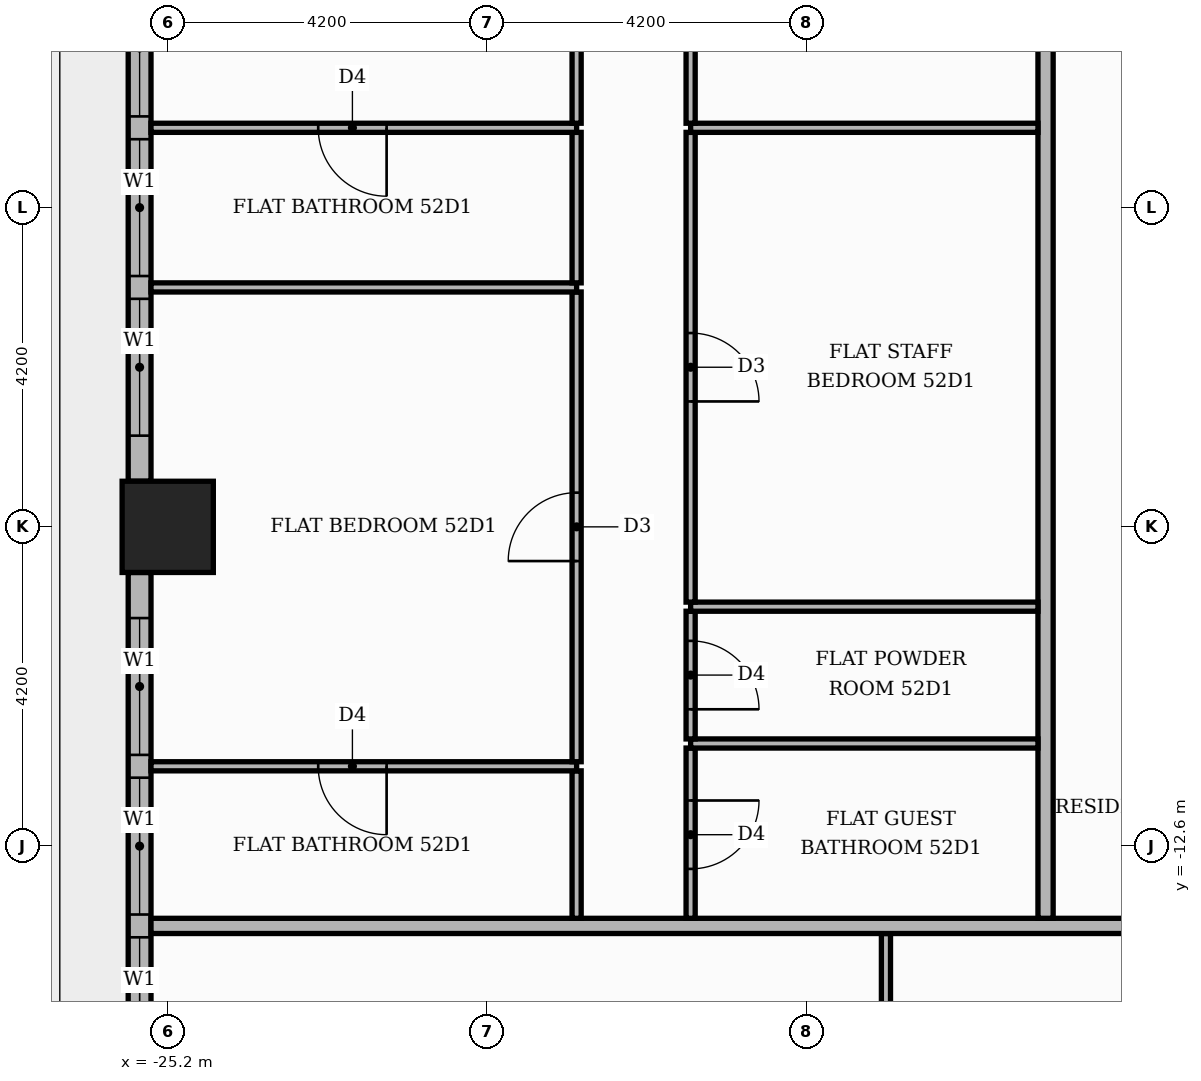
"""IFC4 building model, lengths in metres.
Left out: names, types, materials, properties, quantities, classifications, styles, units other than length and angle.
Written with IfcOpenShell. Run it as: python <this file> out.ifc"""

import sys

from ifc_helpers import new_model, si_unit, direction, frame, frame_2d, origin, origin_2d, place, context, subcontext, project, spatial, rectangle, extrude, element, fill, save


model = new_model("IFC4")
c1 = context("Model", 3, precision=1e-05, world=origin(), true_north=direction((0.0, 1.0)))
c2 = subcontext(c1, "Body", "Model", "MODEL_VIEW")
j1 = project(units=[si_unit("LENGTHUNIT", "METRE"), si_unit("PLANEANGLEUNIT", "RADIAN")], contexts=[c1])
p1 = place(None, origin())
s1 = spatial("IfcSite", under=j1, at=p1, CompositionType="ELEMENT")
p2 = place(p1, origin())
s2 = spatial("IfcBuilding", under=s1, at=p2, CompositionType="ELEMENT")
p3 = place(p2, frame((0.0, 0.0, 219.6)))
s3 = spatial("IfcBuildingStorey", under=s2, at=p3, CompositionType="ELEMENT", Elevation=219.6)
p4 = place(p3, frame((-25.2, -8.4, 0.0), z_axis=(0.0, 0.0, 1.0), x_axis=(1.0, 0.0, 0.0)))
e1 = element("IfcColumn", 1, at=p4, inside=s3, PredefinedType="COLUMN", context=c2, shape_type="SweptSolid", body=[
    extrude(rectangle(XDim=1.2, YDim=1.2, at=origin_2d()), origin(), (0.0, 0.0, 1.0), 3.9),
])
p5 = place(p3, frame((-25.57, -0.6, 0.0), z_axis=(0.0, 0.0, 1.0), x_axis=(0.0, -1.0, 0.0)))
e2 = element("IfcWall", 2, at=p5, inside=s3, PredefinedType="STANDARD", context=c2, shape_type="SweptSolid", body=[
    extrude(rectangle(XDim=7.2, YDim=0.3, at=frame_2d((3.6, 0.0))), origin(), (0.0, 0.0, 1.0), 3.48),
])
p6 = place(p5, frame((0.6, 0.0, 0.9)))
e3 = element("IfcOpeningElement", 3, at=p6, cuts=e2, PredefinedType="OPENING", context=c2, shape_type="SweptSolid", body=[
    extrude(rectangle(XDim=1.8, YDim=2.1, at=frame_2d((0.9, 1.05))), frame((0.0, 0.16, 0.0), z_axis=(0.0, -1.0, 0.0), x_axis=(1.0, 0.0, 0.0)), (0.0, 0.0, 1.0), 0.32),
])
p7 = place(p5, frame((2.7, 0.0, 0.9)))
e4 = element("IfcOpeningElement", 4, at=p7, cuts=e2, PredefinedType="OPENING", context=c2, shape_type="SweptSolid", body=[
    extrude(rectangle(XDim=1.8, YDim=2.1, at=frame_2d((0.9, 1.05))), frame((0.0, 0.16, 0.0), z_axis=(0.0, -1.0, 0.0), x_axis=(1.0, 0.0, 0.0)), (0.0, 0.0, 1.0), 0.32),
])
p8 = place(p5, frame((4.8, 0.0, 0.9)))
e5 = element("IfcOpeningElement", 5, at=p8, cuts=e2, PredefinedType="OPENING", context=c2, shape_type="SweptSolid", body=[
    extrude(rectangle(XDim=1.8, YDim=2.1, at=frame_2d((0.9, 1.05))), frame((0.0, 0.16, 0.0), z_axis=(0.0, -1.0, 0.0), x_axis=(1.0, 0.0, 0.0)), (0.0, 0.0, 1.0), 0.32),
])
p9 = place(p3, frame((-25.57, -9.0, 0.0), z_axis=(0.0, 0.0, 1.0), x_axis=(0.0, -1.0, 0.0)))
e6 = element("IfcWall", 6, at=p9, inside=s3, PredefinedType="STANDARD", context=c2, shape_type="SweptSolid", body=[
    extrude(rectangle(XDim=7.2, YDim=0.3, at=frame_2d((3.6, 0.0))), origin(), (0.0, 0.0, 1.0), 3.48),
])
p10 = place(p9, frame((0.6, 0.0, 0.9)))
e7 = element("IfcOpeningElement", 7, at=p10, cuts=e6, PredefinedType="OPENING", context=c2, shape_type="SweptSolid", body=[
    extrude(rectangle(XDim=1.8, YDim=2.1, at=frame_2d((0.9, 1.05))), frame((0.0, 0.16, 0.0), z_axis=(0.0, -1.0, 0.0), x_axis=(1.0, 0.0, 0.0)), (0.0, 0.0, 1.0), 0.32),
])
p11 = place(p9, frame((2.7, 0.0, 0.9)))
e8 = element("IfcOpeningElement", 8, at=p11, cuts=e6, PredefinedType="OPENING", context=c2, shape_type="SweptSolid", body=[
    extrude(rectangle(XDim=1.8, YDim=2.1, at=frame_2d((0.9, 1.05))), frame((0.0, 0.16, 0.0), z_axis=(0.0, -1.0, 0.0), x_axis=(1.0, 0.0, 0.0)), (0.0, 0.0, 1.0), 0.32),
])
p12 = place(p9, frame((4.8, 0.0, 0.9)))
e9 = element("IfcOpeningElement", 9, at=p12, cuts=e6, PredefinedType="OPENING", context=c2, shape_type="SweptSolid", body=[
    extrude(rectangle(XDim=1.8, YDim=2.1, at=frame_2d((0.9, 1.05))), frame((0.0, 0.16, 0.0), z_axis=(0.0, -1.0, 0.0), x_axis=(1.0, 0.0, 0.0)), (0.0, 0.0, 1.0), 0.32),
])
p13 = place(p3, frame((-15.75, -20.06, 0.0), z_axis=(0.0, 0.0, 1.0), x_axis=(0.0, 1.0, 0.0)))
e10 = element("IfcWall", 10, at=p13, inside=s3, PredefinedType="PARTITIONING", context=c2, shape_type="SweptSolid", body=[
    extrude(rectangle(XDim=6.31, YDim=0.12, at=frame_2d((3.155, 0.0))), origin(), (0.0, 0.0, 1.0), 3.48),
])
p14 = place(p13, frame((2.675, 0.0, 0.0)))
e11 = element("IfcOpeningElement", 11, at=p14, cuts=e10, PredefinedType="OPENING", context=c2, shape_type="SweptSolid", body=[
    extrude(rectangle(XDim=1.0, YDim=2.1, at=frame_2d((0.5, 1.05))), frame((0.0, 0.07, 0.0), z_axis=(0.0, -1.0, 0.0), x_axis=(1.0, 0.0, 0.0)), (0.0, 0.0, 1.0), 0.14),
])
p15 = place(p3, frame((-25.42, -13.65, 0.0), z_axis=(0.0, 0.0, 1.0), x_axis=(1.0, 0.0, 0.0)))
e12 = element("IfcWall", 12, at=p15, inside=s3, PredefinedType="PARTITIONING", context=c2, shape_type="SweptSolid", body=[
    extrude(rectangle(XDim=39.07, YDim=0.2, at=frame_2d((19.535, 0.0))), origin(), (0.0, 0.0, 1.0), 3.48),
])
p16 = place(p15, frame((13.32, 0.0, 0.0)))
e13 = element("IfcOpeningElement", 13, at=p16, cuts=e12, PredefinedType="OPENING", context=c2, shape_type="SweptSolid", body=[
    extrude(rectangle(XDim=1.1, YDim=2.4, at=frame_2d((0.55, 1.2))), frame((0.0, 0.11, 0.0), z_axis=(0.0, -1.0, 0.0), x_axis=(1.0, 0.0, 0.0)), (0.0, 0.0, 1.0), 0.22),
])
p17 = place(p15, frame((21.72, 0.0, 0.0)))
e14 = element("IfcOpeningElement", 14, at=p17, cuts=e12, PredefinedType="OPENING", context=c2, shape_type="SweptSolid", body=[
    extrude(rectangle(XDim=1.1, YDim=2.4, at=frame_2d((0.55, 1.2))), frame((0.0, 0.11, 0.0), z_axis=(0.0, -1.0, 0.0), x_axis=(1.0, 0.0, 0.0)), (0.0, 0.0, 1.0), 0.22),
])
p18 = place(p3, frame((-19.82, -13.55, 0.0), z_axis=(0.0, 0.0, 1.0), x_axis=(0.0, 1.0, 0.0)))
e15 = element("IfcWall", 15, at=p18, inside=s3, PredefinedType="PARTITIONING", context=c2, shape_type="SweptSolid", body=[
    extrude(rectangle(XDim=1.94, YDim=0.12, at=frame_2d((0.97, 0.0))), origin(), (0.0, 0.0, 1.0), 3.48),
])
p19 = place(p3, frame((-18.32, -13.55, 0.0), z_axis=(0.0, 0.0, 1.0), x_axis=(0.0, 1.0, 0.0)))
e16 = element("IfcWall", 16, at=p19, inside=s3, PredefinedType="PARTITIONING", context=c2, shape_type="SweptSolid", body=[
    extrude(rectangle(XDim=2.24, YDim=0.12, at=frame_2d((1.12, 0.0))), origin(), (0.0, 0.0, 1.0), 3.48),
])
p20 = place(p19, frame((0.65, 0.0, 0.0)))
e17 = element("IfcOpeningElement", 17, at=p20, cuts=e16, PredefinedType="OPENING", context=c2, shape_type="SweptSolid", body=[
    extrude(rectangle(XDim=0.9, YDim=2.1, at=frame_2d((0.45, 1.05))), frame((0.0, 0.07, 0.0), z_axis=(0.0, -1.0, 0.0), x_axis=(1.0, 0.0, 0.0)), (0.0, 0.0, 1.0), 0.14),
])
p21 = place(p3, frame((-13.65, -13.55, 0.0), z_axis=(0.0, 0.0, 1.0), x_axis=(0.0, 1.0, 0.0)))
e18 = element("IfcWall", 18, at=p21, inside=s3, PredefinedType="PARTITIONING", context=c2, shape_type="SweptSolid", body=[
    extrude(rectangle(XDim=27.1, YDim=0.2, at=frame_2d((13.55, 0.0))), origin(), (0.0, 0.0, 1.0), 3.48),
])
p22 = place(p21, frame((23.5, 0.0, 0.0)))
e19 = element("IfcOpeningElement", 19, at=p22, cuts=e18, PredefinedType="OPENING", context=c2, shape_type="SweptSolid", body=[
    extrude(rectangle(XDim=1.1, YDim=2.4, at=frame_2d((0.55, 1.2))), frame((0.0, 0.11, 0.0), z_axis=(0.0, -1.0, 0.0), x_axis=(1.0, 0.0, 0.0)), (0.0, 0.0, 1.0), 0.22),
])
p23 = place(p3, frame((-25.42, -11.55, 0.0), z_axis=(0.0, 0.0, 1.0), x_axis=(1.0, 0.0, 0.0)))
e20 = element("IfcWall", 20, at=p23, inside=s3, PredefinedType="PARTITIONING", context=c2, shape_type="SweptSolid", body=[
    extrude(rectangle(XDim=5.6, YDim=0.12, at=frame_2d((2.8, 0.0))), origin(), (0.0, 0.0, 1.0), 3.48),
])
p24 = place(p23, frame((2.2, 0.0, 0.0)))
e21 = element("IfcOpeningElement", 21, at=p24, cuts=e20, PredefinedType="OPENING", context=c2, shape_type="SweptSolid", body=[
    extrude(rectangle(XDim=0.9, YDim=2.1, at=frame_2d((0.45, 1.05))), frame((0.0, 0.07, 0.0), z_axis=(0.0, -1.0, 0.0), x_axis=(1.0, 0.0, 0.0)), (0.0, 0.0, 1.0), 0.14),
])
p25 = place(p3, frame((-19.82, -11.49, 0.0), z_axis=(0.0, 0.0, 1.0), x_axis=(0.0, 1.0, 0.0)))
e22 = element("IfcWall", 22, at=p25, inside=s3, PredefinedType="PARTITIONING", context=c2, shape_type="SweptSolid", body=[
    extrude(rectangle(XDim=6.18, YDim=0.12, at=frame_2d((3.09, 0.0))), origin(), (0.0, 0.0, 1.0), 3.48),
])
p26 = place(p25, frame((2.64, 0.0, 0.0)))
e23 = element("IfcOpeningElement", 23, at=p26, cuts=e22, PredefinedType="OPENING", context=c2, shape_type="SweptSolid", body=[
    extrude(rectangle(XDim=0.9, YDim=2.1, at=frame_2d((0.45, 1.05))), frame((0.0, 0.07, 0.0), z_axis=(0.0, -1.0, 0.0), x_axis=(1.0, 0.0, 0.0)), (0.0, 0.0, 1.0), 0.14),
])
p27 = place(p3, frame((-18.32, -11.25, 0.0), z_axis=(0.0, 0.0, 1.0), x_axis=(1.0, 0.0, 0.0)))
e24 = element("IfcWall", 24, at=p27, inside=s3, PredefinedType="PARTITIONING", context=c2, shape_type="SweptSolid", body=[
    extrude(rectangle(XDim=4.57, YDim=0.12, at=frame_2d((2.285, 0.0))), origin(), (0.0, 0.0, 1.0), 3.48),
])
p28 = place(p3, frame((-18.32, -11.19, 0.0), z_axis=(0.0, 0.0, 1.0), x_axis=(0.0, 1.0, 0.0)))
e25 = element("IfcWall", 25, at=p28, inside=s3, PredefinedType="PARTITIONING", context=c2, shape_type="SweptSolid", body=[
    extrude(rectangle(XDim=1.68, YDim=0.12, at=frame_2d((0.84, 0.0))), origin(), (0.0, 0.0, 1.0), 3.48),
])
p29 = place(p28, frame((0.39, 0.0, 0.0)))
e26 = element("IfcOpeningElement", 26, at=p29, cuts=e25, PredefinedType="OPENING", context=c2, shape_type="SweptSolid", body=[
    extrude(rectangle(XDim=0.9, YDim=2.1, at=frame_2d((0.45, 1.05))), frame((0.0, 0.07, 0.0), z_axis=(0.0, -1.0, 0.0), x_axis=(1.0, 0.0, 0.0)), (0.0, 0.0, 1.0), 0.14),
])
p30 = place(p3, frame((-18.32, -9.45, 0.0), z_axis=(0.0, 0.0, 1.0), x_axis=(1.0, 0.0, 0.0)))
e27 = element("IfcWall", 27, at=p30, inside=s3, PredefinedType="PARTITIONING", context=c2, shape_type="SweptSolid", body=[
    extrude(rectangle(XDim=4.57, YDim=0.12, at=frame_2d((2.285, 0.0))), origin(), (0.0, 0.0, 1.0), 3.48),
])
p31 = place(p3, frame((-18.32, -9.39, 0.0), z_axis=(0.0, 0.0, 1.0), x_axis=(0.0, 1.0, 0.0)))
e28 = element("IfcWall", 28, at=p31, inside=s3, PredefinedType="PARTITIONING", context=c2, shape_type="SweptSolid", body=[
    extrude(rectangle(XDim=6.18, YDim=0.12, at=frame_2d((3.09, 0.0))), origin(), (0.0, 0.0, 1.0), 3.48),
])
p32 = place(p31, frame((2.64, 0.0, 0.0)))
e29 = element("IfcOpeningElement", 29, at=p32, cuts=e28, PredefinedType="OPENING", context=c2, shape_type="SweptSolid", body=[
    extrude(rectangle(XDim=0.9, YDim=2.1, at=frame_2d((0.45, 1.05))), frame((0.0, 0.07, 0.0), z_axis=(0.0, -1.0, 0.0), x_axis=(1.0, 0.0, 0.0)), (0.0, 0.0, 1.0), 0.14),
])
p33 = place(p3, frame((-25.42, -5.25, 0.0), z_axis=(0.0, 0.0, 1.0), x_axis=(1.0, 0.0, 0.0)))
e30 = element("IfcWall", 30, at=p33, inside=s3, PredefinedType="PARTITIONING", context=c2, shape_type="SweptSolid", body=[
    extrude(rectangle(XDim=5.6, YDim=0.12, at=frame_2d((2.8, 0.0))), origin(), (0.0, 0.0, 1.0), 3.48),
])
p34 = place(p3, frame((-19.82, -5.19, 0.0), z_axis=(0.0, 0.0, 1.0), x_axis=(0.0, 1.0, 0.0)))
e31 = element("IfcWall", 31, at=p34, inside=s3, PredefinedType="PARTITIONING", context=c2, shape_type="SweptSolid", body=[
    extrude(rectangle(XDim=1.98, YDim=0.12, at=frame_2d((0.99, 0.0))), origin(), (0.0, 0.0, 1.0), 3.48),
])
p35 = place(p3, frame((-25.42, -3.15, 0.0), z_axis=(0.0, 0.0, 1.0), x_axis=(1.0, 0.0, 0.0)))
e32 = element("IfcWall", 32, at=p35, inside=s3, PredefinedType="PARTITIONING", context=c2, shape_type="SweptSolid", body=[
    extrude(rectangle(XDim=5.6, YDim=0.12, at=frame_2d((2.8, 0.0))), origin(), (0.0, 0.0, 1.0), 3.48),
])
p36 = place(p35, frame((2.2, 0.0, 0.0)))
e33 = element("IfcOpeningElement", 33, at=p36, cuts=e32, PredefinedType="OPENING", context=c2, shape_type="SweptSolid", body=[
    extrude(rectangle(XDim=0.9, YDim=2.1, at=frame_2d((0.45, 1.05))), frame((0.0, 0.07, 0.0), z_axis=(0.0, -1.0, 0.0), x_axis=(1.0, 0.0, 0.0)), (0.0, 0.0, 1.0), 0.14),
])
p37 = place(p3, frame((-18.32, -3.15, 0.0), z_axis=(0.0, 0.0, 1.0), x_axis=(1.0, 0.0, 0.0)))
e34 = element("IfcWall", 34, at=p37, inside=s3, PredefinedType="PARTITIONING", context=c2, shape_type="SweptSolid", body=[
    extrude(rectangle(XDim=4.57, YDim=0.12, at=frame_2d((2.285, 0.0))), origin(), (0.0, 0.0, 1.0), 3.48),
])
p38 = place(p3, frame((-19.82, -3.09, 0.0), z_axis=(0.0, 0.0, 1.0), x_axis=(0.0, 1.0, 0.0)))
e35 = element("IfcWall", 35, at=p38, inside=s3, PredefinedType="PARTITIONING", context=c2, shape_type="SweptSolid", body=[
    extrude(rectangle(XDim=4.08, YDim=0.12, at=frame_2d((2.04, 0.0))), origin(), (0.0, 0.0, 1.0), 3.48),
])
p39 = place(p38, frame((1.59, 0.0, 0.0)))
e36 = element("IfcOpeningElement", 36, at=p39, cuts=e35, PredefinedType="OPENING", context=c2, shape_type="SweptSolid", body=[
    extrude(rectangle(XDim=0.9, YDim=2.1, at=frame_2d((0.45, 1.05))), frame((0.0, 0.07, 0.0), z_axis=(0.0, -1.0, 0.0), x_axis=(1.0, 0.0, 0.0)), (0.0, 0.0, 1.0), 0.14),
])
p40 = place(p3, frame((-18.32, -3.09, 0.0), z_axis=(0.0, 0.0, 1.0), x_axis=(0.0, 1.0, 0.0)))
e37 = element("IfcWall", 37, at=p40, inside=s3, PredefinedType="PARTITIONING", context=c2, shape_type="SweptSolid", body=[
    extrude(rectangle(XDim=4.08, YDim=0.12, at=frame_2d((2.04, 0.0))), origin(), (0.0, 0.0, 1.0), 3.48),
])
p41 = place(p40, frame((1.59, 0.0, 0.0)))
e38 = element("IfcOpeningElement", 38, at=p41, cuts=e37, PredefinedType="OPENING", context=c2, shape_type="SweptSolid", body=[
    extrude(rectangle(XDim=0.9, YDim=2.1, at=frame_2d((0.45, 1.05))), frame((0.0, 0.07, 0.0), z_axis=(0.0, -1.0, 0.0), x_axis=(1.0, 0.0, 0.0)), (0.0, 0.0, 1.0), 0.14),
])
p42 = place(p6, origin())
e39 = element("IfcWindow", 39, at=p42, inside=s3, PartitioningType="SINGLE_PANEL", PredefinedType="WINDOW", context=c2, shape_type="SweptSolid", body=[
    extrude(rectangle(XDim=1.8, YDim=2.1, at=frame_2d((0.9, 1.05))), frame((0.0, 0.03, 0.0), z_axis=(0.0, -1.0, 0.0), x_axis=(1.0, 0.0, 0.0)), (0.0, 0.0, 1.0), 0.06),
])
fill(e3, e39)
p43 = place(p7, origin())
e40 = element("IfcWindow", 40, at=p43, inside=s3, PartitioningType="SINGLE_PANEL", PredefinedType="WINDOW", context=c2, shape_type="SweptSolid", body=[
    extrude(rectangle(XDim=1.8, YDim=2.1, at=frame_2d((0.9, 1.05))), frame((0.0, 0.03, 0.0), z_axis=(0.0, -1.0, 0.0), x_axis=(1.0, 0.0, 0.0)), (0.0, 0.0, 1.0), 0.06),
])
fill(e4, e40)
p44 = place(p8, origin())
e41 = element("IfcWindow", 41, at=p44, inside=s3, PartitioningType="SINGLE_PANEL", PredefinedType="WINDOW", context=c2, shape_type="SweptSolid", body=[
    extrude(rectangle(XDim=1.8, YDim=2.1, at=frame_2d((0.9, 1.05))), frame((0.0, 0.03, 0.0), z_axis=(0.0, -1.0, 0.0), x_axis=(1.0, 0.0, 0.0)), (0.0, 0.0, 1.0), 0.06),
])
fill(e5, e41)
p45 = place(p10, origin())
e42 = element("IfcWindow", 42, at=p45, inside=s3, PartitioningType="SINGLE_PANEL", PredefinedType="WINDOW", context=c2, shape_type="SweptSolid", body=[
    extrude(rectangle(XDim=1.8, YDim=2.1, at=frame_2d((0.9, 1.05))), frame((0.0, 0.03, 0.0), z_axis=(0.0, -1.0, 0.0), x_axis=(1.0, 0.0, 0.0)), (0.0, 0.0, 1.0), 0.06),
])
fill(e7, e42)
p46 = place(p11, origin())
e43 = element("IfcWindow", 43, at=p46, inside=s3, PartitioningType="SINGLE_PANEL", PredefinedType="WINDOW", context=c2, shape_type="SweptSolid", body=[
    extrude(rectangle(XDim=1.8, YDim=2.1, at=frame_2d((0.9, 1.05))), frame((0.0, 0.03, 0.0), z_axis=(0.0, -1.0, 0.0), x_axis=(1.0, 0.0, 0.0)), (0.0, 0.0, 1.0), 0.06),
])
fill(e8, e43)
p47 = place(p12, origin())
e44 = element("IfcWindow", 44, at=p47, inside=s3, PartitioningType="SINGLE_PANEL", PredefinedType="WINDOW", context=c2, shape_type="SweptSolid", body=[
    extrude(rectangle(XDim=1.8, YDim=2.1, at=frame_2d((0.9, 1.05))), frame((0.0, 0.03, 0.0), z_axis=(0.0, -1.0, 0.0), x_axis=(1.0, 0.0, 0.0)), (0.0, 0.0, 1.0), 0.06),
])
fill(e9, e44)
p48 = place(p32, frame((0.9, 0.0, 0.0), z_axis=(0.0, 0.0, 1.0), x_axis=(-1.0, 0.0, 0.0)))
e45 = element("IfcDoor", 45, at=p48, inside=s3, OperationType="SINGLE_SWING_LEFT", PredefinedType="DOOR", context=c2, shape_type="SweptSolid", body=[
    extrude(rectangle(XDim=0.9, YDim=2.1, at=frame_2d((0.45, 1.05))), frame((0.0, 0.025, 0.0), z_axis=(0.0, -1.0, 0.0), x_axis=(1.0, 0.0, 0.0)), (0.0, 0.0, 1.0), 0.05),
])
fill(e29, e45)
p49 = place(p29, frame((0.9, 0.0, 0.0), z_axis=(0.0, 0.0, 1.0), x_axis=(-1.0, 0.0, 0.0)))
e46 = element("IfcDoor", 46, at=p49, inside=s3, OperationType="SINGLE_SWING_LEFT", PredefinedType="DOOR", context=c2, shape_type="SweptSolid", body=[
    extrude(rectangle(XDim=0.9, YDim=2.1, at=frame_2d((0.45, 1.05))), frame((0.0, 0.025, 0.0), z_axis=(0.0, -1.0, 0.0), x_axis=(1.0, 0.0, 0.0)), (0.0, 0.0, 1.0), 0.05),
])
fill(e26, e46)
p50 = place(p20, frame((0.9, 0.0, 0.0), z_axis=(0.0, 0.0, 1.0), x_axis=(-1.0, 0.0, 0.0)))
e47 = element("IfcDoor", 47, at=p50, inside=s3, OperationType="SINGLE_SWING_RIGHT", PredefinedType="DOOR", context=c2, shape_type="SweptSolid", body=[
    extrude(rectangle(XDim=0.9, YDim=2.1, at=frame_2d((0.45, 1.05))), frame((0.0, 0.025, 0.0), z_axis=(0.0, -1.0, 0.0), x_axis=(1.0, 0.0, 0.0)), (0.0, 0.0, 1.0), 0.05),
])
fill(e17, e47)
p51 = place(p36, frame((0.9, 0.0, 0.0), z_axis=(0.0, 0.0, 1.0), x_axis=(-1.0, 0.0, 0.0)))
e48 = element("IfcDoor", 48, at=p51, inside=s3, OperationType="SINGLE_SWING_RIGHT", PredefinedType="DOOR", context=c2, shape_type="SweptSolid", body=[
    extrude(rectangle(XDim=0.9, YDim=2.1, at=frame_2d((0.45, 1.05))), frame((0.0, 0.025, 0.0), z_axis=(0.0, -1.0, 0.0), x_axis=(1.0, 0.0, 0.0)), (0.0, 0.0, 1.0), 0.05),
])
fill(e33, e48)
p52 = place(p26, origin())
e49 = element("IfcDoor", 49, at=p52, inside=s3, OperationType="SINGLE_SWING_LEFT", PredefinedType="DOOR", context=c2, shape_type="SweptSolid", body=[
    extrude(rectangle(XDim=0.9, YDim=2.1, at=frame_2d((0.45, 1.05))), frame((0.0, 0.025, 0.0), z_axis=(0.0, -1.0, 0.0), x_axis=(1.0, 0.0, 0.0)), (0.0, 0.0, 1.0), 0.05),
])
fill(e23, e49)
p53 = place(p24, frame((0.9, 0.0, 0.0), z_axis=(0.0, 0.0, 1.0), x_axis=(-1.0, 0.0, 0.0)))
e50 = element("IfcDoor", 50, at=p53, inside=s3, OperationType="SINGLE_SWING_RIGHT", PredefinedType="DOOR", context=c2, shape_type="SweptSolid", body=[
    extrude(rectangle(XDim=0.9, YDim=2.1, at=frame_2d((0.45, 1.05))), frame((0.0, 0.025, 0.0), z_axis=(0.0, -1.0, 0.0), x_axis=(1.0, 0.0, 0.0)), (0.0, 0.0, 1.0), 0.05),
])
fill(e21, e50)
save(model, sys.argv[1])
